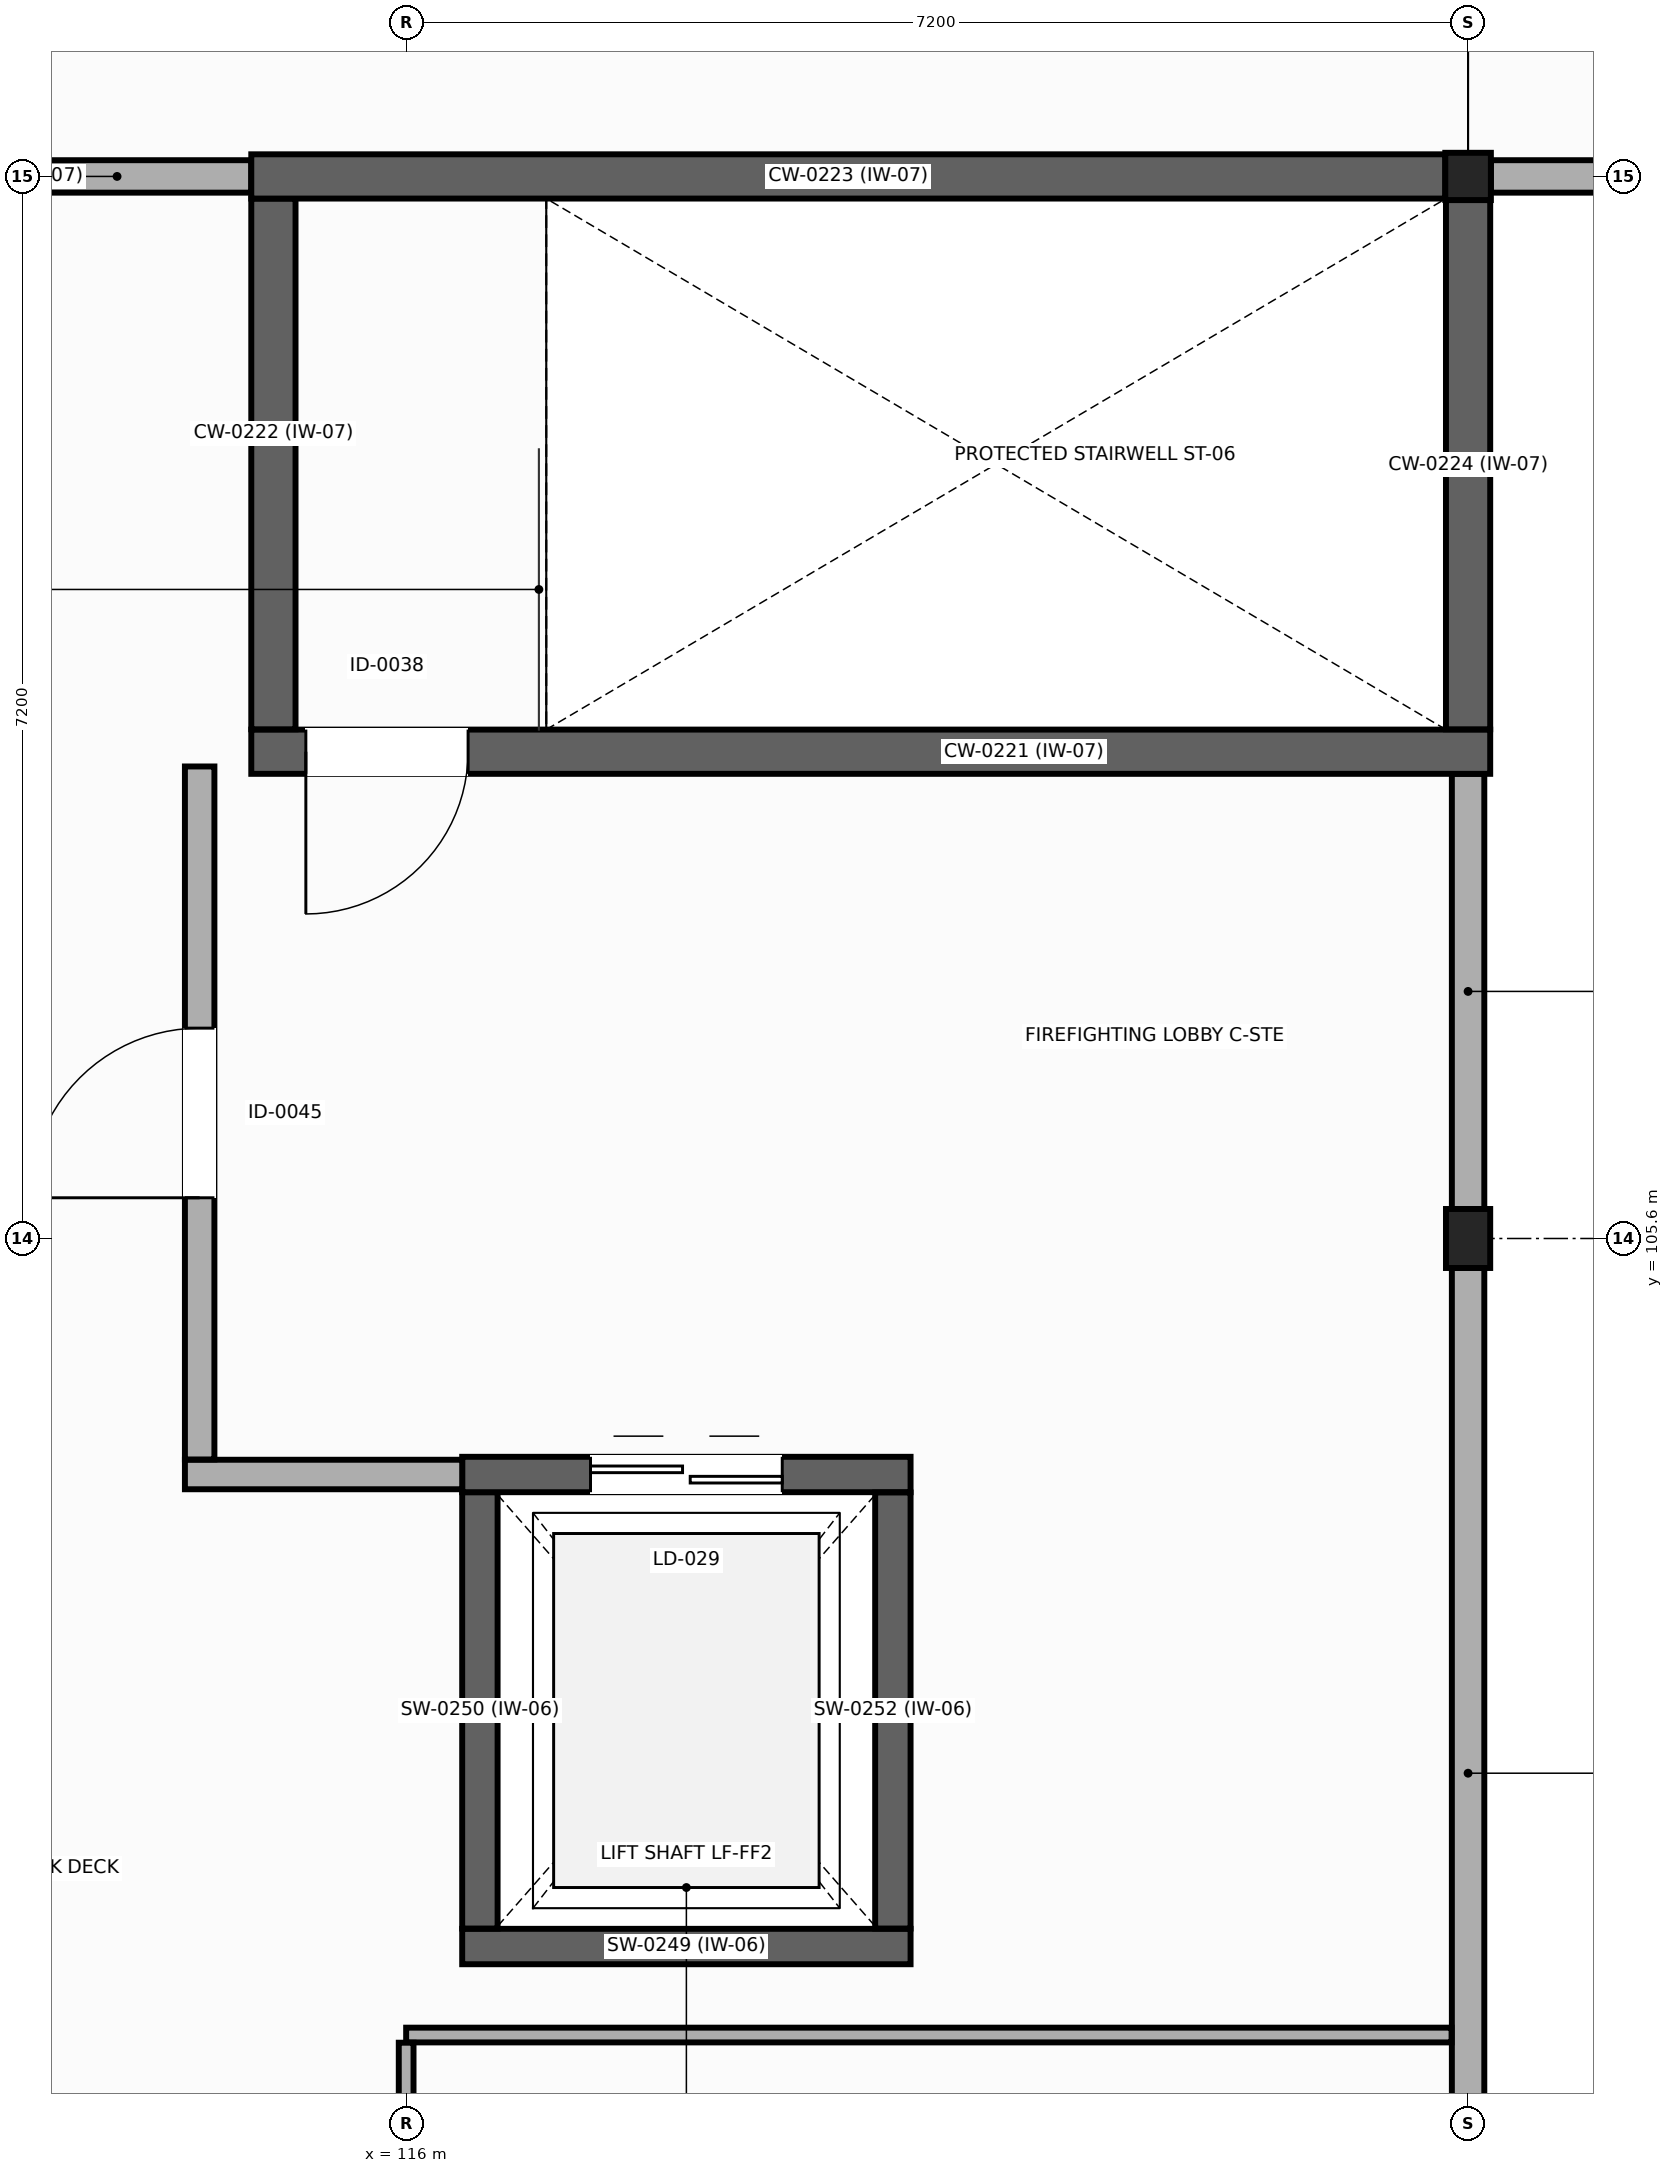
"""IFC4 building model, lengths in metres.
Left out: names, types, materials, properties, quantities, classifications, styles, units other than length and angle.
Written with IfcOpenShell. Run it as: python <this file> out.ifc"""

import sys

from ifc_helpers import new_model, si_unit, direction, frame, frame_2d, origin, origin_2d, place, context, subcontext, project, spatial, rectangle, i_section, extrude, element, fill, save


model = new_model("IFC4")
c1 = context("Model", 3, precision=1e-05, world=origin(), true_north=direction((0.0, 1.0)))
c2 = subcontext(c1, "Body", "Model", "MODEL_VIEW")
j1 = project(units=[si_unit("LENGTHUNIT", "METRE"), si_unit("PLANEANGLEUNIT", "RADIAN")], contexts=[c1])
p1 = place(None, origin())
s1 = spatial("IfcSite", under=j1, at=p1, CompositionType="ELEMENT")
p2 = place(p1, origin())
s2 = spatial("IfcBuilding", under=s1, at=p2, CompositionType="ELEMENT")
p3 = place(p2, frame((0.0, 0.0, 23.1)))
s3 = spatial("IfcBuildingStorey", under=s2, at=p3, CompositionType="ELEMENT", Elevation=23.1)
p4 = place(p3, frame((123.2, 105.6, 0.0), z_axis=(0.0, 0.0, 1.0), x_axis=(1.0, 0.0, 0.0)))
e1 = element("IfcColumn", 1, at=p4, inside=s3, PredefinedType="COLUMN", context=c2, shape_type="SweptSolid", body=[
    extrude(i_section(OverallWidth=0.3, OverallDepth=0.4, WebThickness=0.013, FlangeThickness=0.024, at=origin_2d()), origin(), (0.0, 0.0, 1.0), 4.2),
])
p5 = place(p3, frame((123.2, 112.8, 0.0), z_axis=(0.0, 0.0, 1.0), x_axis=(1.0, 0.0, 0.0)))
e2 = element("IfcColumn", 2, at=p5, inside=s3, PredefinedType="COLUMN", context=c2, shape_type="SweptSolid", body=[
    extrude(i_section(OverallWidth=0.309, OverallDepth=0.321, WebThickness=0.014, FlangeThickness=0.022, at=origin_2d()), origin(), (0.0, 0.0, 1.0), 4.2),
])
p6 = place(p3, frame((109.0, 112.8, 0.0), z_axis=(0.0, 0.0, 1.0), x_axis=(1.0, 0.0, 0.0)))
e3 = element("IfcWall", 3, at=p6, inside=s3, PredefinedType="SOLIDWALL", context=c2, shape_type="SweptSolid", body=[
    extrude(rectangle(XDim=5.95, YDim=0.22, at=frame_2d((2.975, 0.0))), origin(), (0.0, 0.0, 1.0), 4.046),
])
p7 = place(p6, frame((2.425, 0.0, 0.0)))
e4 = element("IfcOpeningElement", 4, at=p7, cuts=e3, PredefinedType="OPENING", context=c2, shape_type="SweptSolid", body=[
    extrude(rectangle(XDim=1.1, YDim=2.15, at=frame_2d((0.55, 1.075))), frame((0.0, 0.12, 0.0), z_axis=(0.0, -1.0, 0.0), x_axis=(1.0, 0.0, 0.0)), (0.0, 0.0, 1.0), 0.24),
])
p8 = place(p3, frame((123.2, 108.75, 0.0), z_axis=(0.0, 0.0, 1.0), x_axis=(0.0, -1.0, 0.0)))
e5 = element("IfcWall", 5, at=p8, inside=s3, PredefinedType="SOLIDWALL", context=c2, shape_type="SweptSolid", body=[
    extrude(rectangle(XDim=2.95, YDim=0.22, at=frame_2d((1.475, 0.0))), origin(), (0.0, 0.0, 1.0), 4.2),
])
p9 = place(p3, frame((123.2, 105.4, 0.0), z_axis=(0.0, 0.0, 1.0), x_axis=(0.0, -1.0, 0.0)))
e6 = element("IfcWall", 6, at=p9, inside=s3, PredefinedType="SOLIDWALL", context=c2, shape_type="SweptSolid", body=[
    extrude(rectangle(XDim=6.85, YDim=0.22, at=frame_2d((3.425, 0.0))), origin(), (0.0, 0.0, 1.0), 4.2),
])
p10 = place(p3, frame((130.1, 112.8, 0.0), z_axis=(0.0, 0.0, 1.0), x_axis=(-1.0, 0.0, 0.0)))
e7 = element("IfcWall", 7, at=p10, inside=s3, PredefinedType="SOLIDWALL", context=c2, shape_type="SweptSolid", body=[
    extrude(rectangle(XDim=6.746, YDim=0.22, at=frame_2d((3.373, 0.0))), origin(), (0.0, 0.0, 1.0), 4.046),
])
p11 = place(p10, frame((2.473, 0.0, 0.85)))
e8 = element("IfcOpeningElement", 8, at=p11, cuts=e7, PredefinedType="OPENING", context=c2, shape_type="SweptSolid", body=[
    extrude(rectangle(XDim=1.8, YDim=1.2, at=frame_2d((0.9, 0.6))), frame((0.0, 0.12, 0.0), z_axis=(0.0, -1.0, 0.0), x_axis=(1.0, 0.0, 0.0)), (0.0, 0.0, 1.0), 0.24),
])
p12 = place(p3, frame((123.35, 108.9, 0.0), z_axis=(0.0, 0.0, 1.0), x_axis=(-1.0, 0.0, 0.0)))
e9 = element("IfcWall", 9, at=p12, inside=s3, PredefinedType="SHEAR", context=c2, shape_type="SweptSolid", body=[
    extrude(rectangle(XDim=8.4, YDim=0.3, at=frame_2d((4.2, 0.0))), origin(), (0.0, 0.0, 1.0), 3.88),
])
p13 = place(p12, frame((6.93, 0.0, 0.0)))
e10 = element("IfcOpeningElement", 10, at=p13, cuts=e9, PredefinedType="OPENING", context=c2, shape_type="SweptSolid", body=[
    extrude(rectangle(XDim=1.1, YDim=2.15, at=frame_2d((0.55, 1.075))), frame((0.0, 0.16, 0.0), z_axis=(0.0, -1.0, 0.0), x_axis=(1.0, 0.0, 0.0)), (0.0, 0.0, 1.0), 0.32),
])
p14 = place(p3, frame((115.1, 109.052, 0.0), z_axis=(0.0, 0.0, 1.0), x_axis=(0.0, 1.0, 0.0)))
e11 = element("IfcWall", 11, at=p14, inside=s3, PredefinedType="SHEAR", context=c2, shape_type="SweptSolid", body=[
    extrude(rectangle(XDim=3.598, YDim=0.3, at=frame_2d((1.799, 0.0))), origin(), (0.0, 0.0, 1.0), 3.88),
])
p15 = place(p3, frame((114.95, 112.8, 0.0), z_axis=(0.0, 0.0, 1.0), x_axis=(1.0, 0.0, 0.0)))
e12 = element("IfcWall", 12, at=p15, inside=s3, PredefinedType="SHEAR", context=c2, shape_type="SweptSolid", body=[
    extrude(rectangle(XDim=8.095, YDim=0.3, at=frame_2d((4.048, 0.0))), origin(), (0.0, 0.0, 1.0), 3.88),
])
p16 = place(p3, frame((123.2, 112.64, 0.0), z_axis=(0.0, 0.0, 1.0), x_axis=(0.0, -1.0, 0.0)))
e13 = element("IfcWall", 13, at=p16, inside=s3, PredefinedType="SHEAR", context=c2, shape_type="SweptSolid", body=[
    extrude(rectangle(XDim=3.588, YDim=0.3, at=frame_2d((1.794, 0.0))), origin(), (0.0, 0.0, 1.0), 3.88),
])
p17 = place(p3, frame((119.42, 100.8, 0.0), z_axis=(0.0, 0.0, 1.0), x_axis=(-1.0, 0.0, 0.0)))
e14 = element("IfcWall", 14, at=p17, inside=s3, PredefinedType="SHEAR", context=c2, shape_type="SweptSolid", body=[
    extrude(rectangle(XDim=3.04, YDim=0.24, at=frame_2d((1.52, 0.0))), origin(), (0.0, 0.0, 1.0), 3.88),
])
p18 = place(p3, frame((116.5, 100.922, 0.0), z_axis=(0.0, 0.0, 1.0), x_axis=(0.0, 1.0, 0.0)))
e15 = element("IfcWall", 15, at=p18, inside=s3, PredefinedType="SHEAR", context=c2, shape_type="SweptSolid", body=[
    extrude(rectangle(XDim=2.958, YDim=0.24, at=frame_2d((1.479, 0.0))), origin(), (0.0, 0.0, 1.0), 3.88),
])
p19 = place(p3, frame((116.38, 104.0, 0.0), z_axis=(0.0, 0.0, 1.0), x_axis=(1.0, 0.0, 0.0)))
e16 = element("IfcWall", 16, at=p19, inside=s3, PredefinedType="SHEAR", context=c2, shape_type="SweptSolid", body=[
    extrude(rectangle(XDim=3.04, YDim=0.24, at=frame_2d((1.52, 0.0))), origin(), (0.0, 0.0, 1.0), 3.88),
])
p20 = place(p19, frame((0.87, 0.0, 0.0)))
e17 = element("IfcOpeningElement", 17, at=p20, cuts=e16, PredefinedType="OPENING", context=c2, shape_type="SweptSolid", body=[
    extrude(rectangle(XDim=1.3, YDim=2.15, at=frame_2d((0.65, 1.075))), frame((0.0, 0.13, 0.0), z_axis=(0.0, -1.0, 0.0), x_axis=(1.0, 0.0, 0.0)), (0.0, 0.0, 1.0), 0.26),
])
p21 = place(p3, frame((119.3, 103.878, 0.0), z_axis=(0.0, 0.0, 1.0), x_axis=(0.0, -1.0, 0.0)))
e18 = element("IfcWall", 18, at=p21, inside=s3, PredefinedType="SHEAR", context=c2, shape_type="SweptSolid", body=[
    extrude(rectangle(XDim=2.956, YDim=0.24, at=frame_2d((1.478, 0.0))), origin(), (0.0, 0.0, 1.0), 3.88),
])
p22 = place(p3, frame((116.38, 104.0, 0.0), z_axis=(0.0, 0.0, 1.0), x_axis=(-1.0, 0.0, 0.0)))
e19 = element("IfcWall", 19, at=p22, inside=s3, PredefinedType="PARTITIONING", context=c2, shape_type="SweptSolid", body=[
    extrude(rectangle(XDim=1.88, YDim=0.2, at=frame_2d((0.94, 0.0))), origin(), (0.0, 0.0, 1.0), 3.88),
])
p23 = place(p3, frame((114.6, 104.102, 0.0), z_axis=(0.0, 0.0, 1.0), x_axis=(0.0, 1.0, 0.0)))
e20 = element("IfcWall", 20, at=p23, inside=s3, PredefinedType="PARTITIONING", context=c2, shape_type="SweptSolid", body=[
    extrude(rectangle(XDim=4.698, YDim=0.2, at=frame_2d((2.349, 0.0))), origin(), (0.0, 0.0, 1.0), 3.88),
])
p24 = place(p23, frame((1.774, 0.0, 0.0)))
e21 = element("IfcOpeningElement", 21, at=p24, cuts=e20, PredefinedType="OPENING", context=c2, shape_type="SweptSolid", body=[
    extrude(rectangle(XDim=1.15, YDim=2.15, at=frame_2d((0.575, 1.075))), frame((0.0, 0.11, 0.0), z_axis=(0.0, -1.0, 0.0), x_axis=(1.0, 0.0, 0.0)), (0.0, 0.0, 1.0), 0.22),
])
p25 = place(p3, frame((123.088, 100.2, 0.0), z_axis=(0.0, 0.0, 1.0), x_axis=(-1.0, 0.0, 0.0)))
e22 = element("IfcWall", 22, at=p25, inside=s3, PredefinedType="PARTITIONING", context=c2, shape_type="SweptSolid", body=[
    extrude(rectangle(XDim=7.088, YDim=0.1, at=frame_2d((3.544, 0.0))), origin(), (0.0, 0.0, 1.0), 3.88),
])
p26 = place(p3, frame((116.0, 100.148, 0.0), z_axis=(0.0, 0.0, 1.0), x_axis=(0.0, -1.0, 0.0)))
e23 = element("IfcWall", 23, at=p26, inside=s3, PredefinedType="PARTITIONING", context=c2, shape_type="SweptSolid", body=[
    extrude(rectangle(XDim=8.048, YDim=0.1, at=frame_2d((4.024, 0.0))), origin(), (0.0, 0.0, 1.0), 3.88),
])
p27 = place(p26, frame((3.474, 0.0, 0.0)))
e24 = element("IfcOpeningElement", 24, at=p27, cuts=e23, PredefinedType="OPENING", context=c2, shape_type="SweptSolid", body=[
    extrude(rectangle(XDim=1.1, YDim=2.15, at=frame_2d((0.55, 1.075))), frame((0.0, 0.06, 0.0), z_axis=(0.0, -1.0, 0.0), x_axis=(1.0, 0.0, 0.0)), (0.0, 0.0, 1.0), 0.12),
])
p28 = place(p13, origin())
e25 = element("IfcDoor", 25, at=p28, inside=s3, OperationType="SINGLE_SWING_RIGHT", PredefinedType="DOOR", context=c2, shape_type="SweptSolid", body=[
    extrude(rectangle(XDim=1.1, YDim=2.15, at=frame_2d((0.55, 1.075))), frame((0.0, 0.025, 0.0), z_axis=(0.0, -1.0, 0.0), x_axis=(1.0, 0.0, 0.0)), (0.0, 0.0, 1.0), 0.05),
])
fill(e10, e25)
p29 = place(p20, origin())
e26 = element("IfcDoor", 26, at=p29, inside=s3, OperationType="DOUBLE_DOOR_SLIDING", PredefinedType="DOOR", context=c2, shape_type="SweptSolid", body=[
    extrude(rectangle(XDim=1.3, YDim=2.15, at=frame_2d((0.65, 1.075))), frame((0.0, 0.025, 0.0), z_axis=(0.0, -1.0, 0.0), x_axis=(1.0, 0.0, 0.0)), (0.0, 0.0, 1.0), 0.05),
])
fill(e17, e26)
p30 = place(p24, origin())
e27 = element("IfcDoor", 27, at=p30, inside=s3, OperationType="SINGLE_SWING_LEFT", PredefinedType="DOOR", context=c2, shape_type="SweptSolid", body=[
    extrude(rectangle(XDim=1.15, YDim=2.15, at=frame_2d((0.575, 1.075))), frame((0.0, 0.025, 0.0), z_axis=(0.0, -1.0, 0.0), x_axis=(1.0, 0.0, 0.0)), (0.0, 0.0, 1.0), 0.05),
])
fill(e21, e27)
save(model, sys.argv[1])
